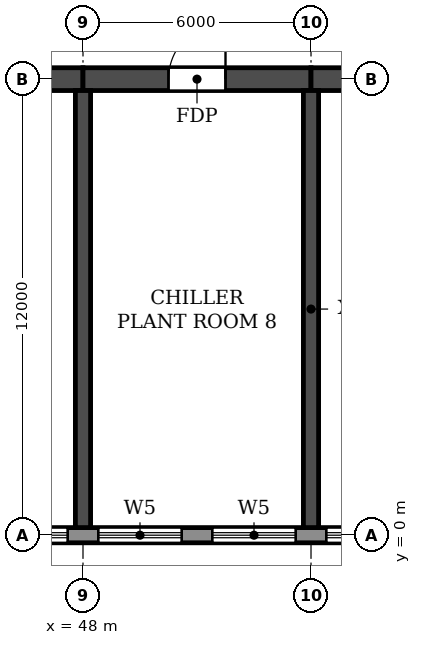
"""IFC4 building model, lengths in metres.
Left out: names, types, materials, properties, quantities, classifications, styles, units other than length and angle.
Written with IfcOpenShell. Run it as: python <this file> out.ifc"""

import sys

from ifc_helpers import new_model, si_unit, direction, frame, frame_2d, origin, place, context, subcontext, project, spatial, rectangle, extrude, element, fill, save


model = new_model("IFC4")
c1 = context("Model", 3, precision=1e-05, world=origin(), true_north=direction((0.0, 1.0)))
c2 = subcontext(c1, "Body", "Model", "MODEL_VIEW")
j1 = project(units=[si_unit("LENGTHUNIT", "METRE"), si_unit("PLANEANGLEUNIT", "RADIAN")], contexts=[c1])
p1 = place(None, origin())
s1 = spatial("IfcSite", under=j1, at=p1, CompositionType="ELEMENT")
p2 = place(p1, origin())
s2 = spatial("IfcBuilding", under=s1, at=p2, CompositionType="ELEMENT")
p3 = place(p2, frame((0.0, 0.0, 66.3)))
s3 = spatial("IfcBuildingStorey", under=s2, at=p3, CompositionType="ELEMENT", Elevation=66.3)
for number, where, z_axis, x_axis in (
    (1, (48.0, 0.2, 0.0), (0.0, 0.0, 1.0), (0.0, 1.0, 0.0)),
    (2, (54.0, 0.2, 0.0), (0.0, 0.0, 1.0), (0.0, 1.0, 0.0)),
):
    element("IfcWall", number, at=place(p3, frame(where, z_axis=z_axis, x_axis=x_axis)), inside=s3, PredefinedType="SHEAR", context=c2, shape_type="SweptSolid", body=[
        extrude(rectangle(XDim=11.5, YDim=0.4, at=frame_2d((5.75, 0.0))), origin(), (0.0, 0.0, 1.0), 6.36),
    ])
p4 = place(p3, frame((42.0, 12.0, 0.0), z_axis=(0.0, 0.0, 1.0), x_axis=(1.0, 0.0, 0.0)))
e3 = element("IfcWall", 3, at=p4, inside=s3, PredefinedType="SHEAR", context=c2, shape_type="SweptSolid", body=[
    extrude(rectangle(XDim=6.0, YDim=0.6, at=frame_2d((3.0, 0.0))), origin(), (0.0, 0.0, 1.0), 6.36),
])
p5 = place(p4, frame((2.25, 0.0, 0.0)))
e4 = element("IfcOpeningElement", 4, at=p5, cuts=e3, PredefinedType="OPENING", context=c2, shape_type="SweptSolid", body=[
    extrude(rectangle(XDim=1.5, YDim=2.1, at=frame_2d((0.75, 1.05))), frame((0.0, 0.31, 0.0), z_axis=(0.0, -1.0, 0.0), x_axis=(1.0, 0.0, 0.0)), (0.0, 0.0, 1.0), 0.62),
])
p6 = place(p3, frame((48.0, 12.0, 0.0), z_axis=(0.0, 0.0, 1.0), x_axis=(1.0, 0.0, 0.0)))
e5 = element("IfcWall", 5, at=p6, inside=s3, PredefinedType="SHEAR", context=c2, shape_type="SweptSolid", body=[
    extrude(rectangle(XDim=6.0, YDim=0.6, at=frame_2d((3.0, 0.0))), origin(), (0.0, 0.0, 1.0), 6.36),
])
p7 = place(p6, frame((2.25, 0.0, 0.0)))
e6 = element("IfcOpeningElement", 6, at=p7, cuts=e5, PredefinedType="OPENING", context=c2, shape_type="SweptSolid", body=[
    extrude(rectangle(XDim=1.5, YDim=2.1, at=frame_2d((0.75, 1.05))), frame((0.0, 0.31, 0.0), z_axis=(0.0, -1.0, 0.0), x_axis=(1.0, 0.0, 0.0)), (0.0, 0.0, 1.0), 0.62),
])
p8 = place(p3, frame((54.0, 12.0, 0.0), z_axis=(0.0, 0.0, 1.0), x_axis=(1.0, 0.0, 0.0)))
e7 = element("IfcWall", 7, at=p8, inside=s3, PredefinedType="SHEAR", context=c2, shape_type="SweptSolid", body=[
    extrude(rectangle(XDim=6.0, YDim=0.6, at=frame_2d((3.0, 0.0))), origin(), (0.0, 0.0, 1.0), 6.36),
])
p9 = place(p8, frame((2.25, 0.0, 0.0)))
e8 = element("IfcOpeningElement", 8, at=p9, cuts=e7, PredefinedType="OPENING", context=c2, shape_type="SweptSolid", body=[
    extrude(rectangle(XDim=1.5, YDim=2.1, at=frame_2d((0.75, 1.05))), frame((0.0, 0.31, 0.0), z_axis=(0.0, -1.0, 0.0), x_axis=(1.0, 0.0, 0.0)), (0.0, 0.0, 1.0), 0.62),
])
p10 = place(p3, frame((10.683, 0.0, 0.0), z_axis=(0.0, 0.0, 1.0), x_axis=(1.0, 0.0, 0.0)))
e9 = element("IfcWall", 9, at=p10, inside=s3, PredefinedType="STANDARD", context=c2, shape_type="SweptSolid", body=[
    extrude(rectangle(XDim=80.634, YDim=0.4, at=frame_2d((40.317, 0.0))), origin(), (0.0, 0.0, 1.0), 6.36),
])
p11 = place(p10, frame((1.717, 0.0, 0.6)))
e10 = element("IfcOpeningElement", 10, at=p11, cuts=e9, PredefinedType="OPENING", context=c2, shape_type="SweptSolid", body=[
    extrude(rectangle(XDim=2.2, YDim=2.4, at=frame_2d((1.1, 1.2))), frame((0.0, 0.21, 0.0), z_axis=(0.0, -1.0, 0.0), x_axis=(1.0, 0.0, 0.0)), (0.0, 0.0, 1.0), 0.42),
])
p12 = place(p10, frame((4.717, 0.0, 0.6)))
e11 = element("IfcOpeningElement", 11, at=p12, cuts=e9, PredefinedType="OPENING", context=c2, shape_type="SweptSolid", body=[
    extrude(rectangle(XDim=2.2, YDim=2.4, at=frame_2d((1.1, 1.2))), frame((0.0, 0.21, 0.0), z_axis=(0.0, -1.0, 0.0), x_axis=(1.0, 0.0, 0.0)), (0.0, 0.0, 1.0), 0.42),
])
p13 = place(p10, frame((7.717, 0.0, 0.6)))
e12 = element("IfcOpeningElement", 12, at=p13, cuts=e9, PredefinedType="OPENING", context=c2, shape_type="SweptSolid", body=[
    extrude(rectangle(XDim=2.2, YDim=2.4, at=frame_2d((1.1, 1.2))), frame((0.0, 0.21, 0.0), z_axis=(0.0, -1.0, 0.0), x_axis=(1.0, 0.0, 0.0)), (0.0, 0.0, 1.0), 0.42),
])
p14 = place(p10, frame((10.717, 0.0, 0.6)))
e13 = element("IfcOpeningElement", 13, at=p14, cuts=e9, PredefinedType="OPENING", context=c2, shape_type="SweptSolid", body=[
    extrude(rectangle(XDim=2.2, YDim=2.4, at=frame_2d((1.1, 1.2))), frame((0.0, 0.21, 0.0), z_axis=(0.0, -1.0, 0.0), x_axis=(1.0, 0.0, 0.0)), (0.0, 0.0, 1.0), 0.42),
])
p15 = place(p10, frame((13.717, 0.0, 0.6)))
e14 = element("IfcOpeningElement", 14, at=p15, cuts=e9, PredefinedType="OPENING", context=c2, shape_type="SweptSolid", body=[
    extrude(rectangle(XDim=2.2, YDim=2.4, at=frame_2d((1.1, 1.2))), frame((0.0, 0.21, 0.0), z_axis=(0.0, -1.0, 0.0), x_axis=(1.0, 0.0, 0.0)), (0.0, 0.0, 1.0), 0.42),
])
p16 = place(p10, frame((16.717, 0.0, 0.6)))
e15 = element("IfcOpeningElement", 15, at=p16, cuts=e9, PredefinedType="OPENING", context=c2, shape_type="SweptSolid", body=[
    extrude(rectangle(XDim=2.2, YDim=2.4, at=frame_2d((1.1, 1.2))), frame((0.0, 0.21, 0.0), z_axis=(0.0, -1.0, 0.0), x_axis=(1.0, 0.0, 0.0)), (0.0, 0.0, 1.0), 0.42),
])
p17 = place(p10, frame((19.717, 0.0, 0.6)))
e16 = element("IfcOpeningElement", 16, at=p17, cuts=e9, PredefinedType="OPENING", context=c2, shape_type="SweptSolid", body=[
    extrude(rectangle(XDim=2.2, YDim=2.4, at=frame_2d((1.1, 1.2))), frame((0.0, 0.21, 0.0), z_axis=(0.0, -1.0, 0.0), x_axis=(1.0, 0.0, 0.0)), (0.0, 0.0, 1.0), 0.42),
])
p18 = place(p10, frame((22.717, 0.0, 0.6)))
e17 = element("IfcOpeningElement", 17, at=p18, cuts=e9, PredefinedType="OPENING", context=c2, shape_type="SweptSolid", body=[
    extrude(rectangle(XDim=2.2, YDim=2.4, at=frame_2d((1.1, 1.2))), frame((0.0, 0.21, 0.0), z_axis=(0.0, -1.0, 0.0), x_axis=(1.0, 0.0, 0.0)), (0.0, 0.0, 1.0), 0.42),
])
p19 = place(p10, frame((25.717, 0.0, 0.6)))
e18 = element("IfcOpeningElement", 18, at=p19, cuts=e9, PredefinedType="OPENING", context=c2, shape_type="SweptSolid", body=[
    extrude(rectangle(XDim=2.2, YDim=2.4, at=frame_2d((1.1, 1.2))), frame((0.0, 0.21, 0.0), z_axis=(0.0, -1.0, 0.0), x_axis=(1.0, 0.0, 0.0)), (0.0, 0.0, 1.0), 0.42),
])
p20 = place(p10, frame((28.717, 0.0, 0.6)))
e19 = element("IfcOpeningElement", 19, at=p20, cuts=e9, PredefinedType="OPENING", context=c2, shape_type="SweptSolid", body=[
    extrude(rectangle(XDim=2.2, YDim=2.4, at=frame_2d((1.1, 1.2))), frame((0.0, 0.21, 0.0), z_axis=(0.0, -1.0, 0.0), x_axis=(1.0, 0.0, 0.0)), (0.0, 0.0, 1.0), 0.42),
])
p21 = place(p10, frame((31.717, 0.0, 0.6)))
e20 = element("IfcOpeningElement", 20, at=p21, cuts=e9, PredefinedType="OPENING", context=c2, shape_type="SweptSolid", body=[
    extrude(rectangle(XDim=2.2, YDim=2.4, at=frame_2d((1.1, 1.2))), frame((0.0, 0.21, 0.0), z_axis=(0.0, -1.0, 0.0), x_axis=(1.0, 0.0, 0.0)), (0.0, 0.0, 1.0), 0.42),
])
p22 = place(p10, frame((34.717, 0.0, 0.6)))
e21 = element("IfcOpeningElement", 21, at=p22, cuts=e9, PredefinedType="OPENING", context=c2, shape_type="SweptSolid", body=[
    extrude(rectangle(XDim=2.2, YDim=2.4, at=frame_2d((1.1, 1.2))), frame((0.0, 0.21, 0.0), z_axis=(0.0, -1.0, 0.0), x_axis=(1.0, 0.0, 0.0)), (0.0, 0.0, 1.0), 0.42),
])
p23 = place(p10, frame((37.717, 0.0, 0.6)))
e22 = element("IfcOpeningElement", 22, at=p23, cuts=e9, PredefinedType="OPENING", context=c2, shape_type="SweptSolid", body=[
    extrude(rectangle(XDim=2.2, YDim=2.4, at=frame_2d((1.1, 1.2))), frame((0.0, 0.21, 0.0), z_axis=(0.0, -1.0, 0.0), x_axis=(1.0, 0.0, 0.0)), (0.0, 0.0, 1.0), 0.42),
])
p24 = place(p10, frame((40.717, 0.0, 0.6)))
e23 = element("IfcOpeningElement", 23, at=p24, cuts=e9, PredefinedType="OPENING", context=c2, shape_type="SweptSolid", body=[
    extrude(rectangle(XDim=2.2, YDim=2.4, at=frame_2d((1.1, 1.2))), frame((0.0, 0.21, 0.0), z_axis=(0.0, -1.0, 0.0), x_axis=(1.0, 0.0, 0.0)), (0.0, 0.0, 1.0), 0.42),
])
p25 = place(p10, frame((43.717, 0.0, 0.6)))
e24 = element("IfcOpeningElement", 24, at=p25, cuts=e9, PredefinedType="OPENING", context=c2, shape_type="SweptSolid", body=[
    extrude(rectangle(XDim=2.2, YDim=2.4, at=frame_2d((1.1, 1.2))), frame((0.0, 0.21, 0.0), z_axis=(0.0, -1.0, 0.0), x_axis=(1.0, 0.0, 0.0)), (0.0, 0.0, 1.0), 0.42),
])
p26 = place(p10, frame((46.717, 0.0, 0.6)))
e25 = element("IfcOpeningElement", 25, at=p26, cuts=e9, PredefinedType="OPENING", context=c2, shape_type="SweptSolid", body=[
    extrude(rectangle(XDim=2.2, YDim=2.4, at=frame_2d((1.1, 1.2))), frame((0.0, 0.21, 0.0), z_axis=(0.0, -1.0, 0.0), x_axis=(1.0, 0.0, 0.0)), (0.0, 0.0, 1.0), 0.42),
])
p27 = place(p10, frame((49.717, 0.0, 0.6)))
e26 = element("IfcOpeningElement", 26, at=p27, cuts=e9, PredefinedType="OPENING", context=c2, shape_type="SweptSolid", body=[
    extrude(rectangle(XDim=2.2, YDim=2.4, at=frame_2d((1.1, 1.2))), frame((0.0, 0.21, 0.0), z_axis=(0.0, -1.0, 0.0), x_axis=(1.0, 0.0, 0.0)), (0.0, 0.0, 1.0), 0.42),
])
p28 = place(p10, frame((52.717, 0.0, 0.6)))
e27 = element("IfcOpeningElement", 27, at=p28, cuts=e9, PredefinedType="OPENING", context=c2, shape_type="SweptSolid", body=[
    extrude(rectangle(XDim=2.2, YDim=2.4, at=frame_2d((1.1, 1.2))), frame((0.0, 0.21, 0.0), z_axis=(0.0, -1.0, 0.0), x_axis=(1.0, 0.0, 0.0)), (0.0, 0.0, 1.0), 0.42),
])
p29 = place(p10, frame((55.717, 0.0, 0.6)))
e28 = element("IfcOpeningElement", 28, at=p29, cuts=e9, PredefinedType="OPENING", context=c2, shape_type="SweptSolid", body=[
    extrude(rectangle(XDim=2.2, YDim=2.4, at=frame_2d((1.1, 1.2))), frame((0.0, 0.21, 0.0), z_axis=(0.0, -1.0, 0.0), x_axis=(1.0, 0.0, 0.0)), (0.0, 0.0, 1.0), 0.42),
])
p30 = place(p10, frame((58.717, 0.0, 0.6)))
e29 = element("IfcOpeningElement", 29, at=p30, cuts=e9, PredefinedType="OPENING", context=c2, shape_type="SweptSolid", body=[
    extrude(rectangle(XDim=2.2, YDim=2.4, at=frame_2d((1.1, 1.2))), frame((0.0, 0.21, 0.0), z_axis=(0.0, -1.0, 0.0), x_axis=(1.0, 0.0, 0.0)), (0.0, 0.0, 1.0), 0.42),
])
p31 = place(p10, frame((61.717, 0.0, 0.6)))
e30 = element("IfcOpeningElement", 30, at=p31, cuts=e9, PredefinedType="OPENING", context=c2, shape_type="SweptSolid", body=[
    extrude(rectangle(XDim=2.2, YDim=2.4, at=frame_2d((1.1, 1.2))), frame((0.0, 0.21, 0.0), z_axis=(0.0, -1.0, 0.0), x_axis=(1.0, 0.0, 0.0)), (0.0, 0.0, 1.0), 0.42),
])
p32 = place(p10, frame((64.717, 0.0, 0.6)))
e31 = element("IfcOpeningElement", 31, at=p32, cuts=e9, PredefinedType="OPENING", context=c2, shape_type="SweptSolid", body=[
    extrude(rectangle(XDim=2.2, YDim=2.4, at=frame_2d((1.1, 1.2))), frame((0.0, 0.21, 0.0), z_axis=(0.0, -1.0, 0.0), x_axis=(1.0, 0.0, 0.0)), (0.0, 0.0, 1.0), 0.42),
])
p33 = place(p10, frame((67.717, 0.0, 0.6)))
e32 = element("IfcOpeningElement", 32, at=p33, cuts=e9, PredefinedType="OPENING", context=c2, shape_type="SweptSolid", body=[
    extrude(rectangle(XDim=2.2, YDim=2.4, at=frame_2d((1.1, 1.2))), frame((0.0, 0.21, 0.0), z_axis=(0.0, -1.0, 0.0), x_axis=(1.0, 0.0, 0.0)), (0.0, 0.0, 1.0), 0.42),
])
p34 = place(p10, frame((70.717, 0.0, 0.6)))
e33 = element("IfcOpeningElement", 33, at=p34, cuts=e9, PredefinedType="OPENING", context=c2, shape_type="SweptSolid", body=[
    extrude(rectangle(XDim=2.2, YDim=2.4, at=frame_2d((1.1, 1.2))), frame((0.0, 0.21, 0.0), z_axis=(0.0, -1.0, 0.0), x_axis=(1.0, 0.0, 0.0)), (0.0, 0.0, 1.0), 0.42),
])
p35 = place(p10, frame((73.717, 0.0, 0.6)))
e34 = element("IfcOpeningElement", 34, at=p35, cuts=e9, PredefinedType="OPENING", context=c2, shape_type="SweptSolid", body=[
    extrude(rectangle(XDim=2.2, YDim=2.4, at=frame_2d((1.1, 1.2))), frame((0.0, 0.21, 0.0), z_axis=(0.0, -1.0, 0.0), x_axis=(1.0, 0.0, 0.0)), (0.0, 0.0, 1.0), 0.42),
])
p36 = place(p10, frame((76.717, 0.0, 0.6)))
e35 = element("IfcOpeningElement", 35, at=p36, cuts=e9, PredefinedType="OPENING", context=c2, shape_type="SweptSolid", body=[
    extrude(rectangle(XDim=2.2, YDim=2.4, at=frame_2d((1.1, 1.2))), frame((0.0, 0.21, 0.0), z_axis=(0.0, -1.0, 0.0), x_axis=(1.0, 0.0, 0.0)), (0.0, 0.0, 1.0), 0.42),
])
p37 = place(p22, origin())
e36 = element("IfcWindow", 36, at=p37, inside=s3, PartitioningType="TRIPLE_PANEL_HORIZONTAL", PredefinedType="WINDOW", context=c2, shape_type="SweptSolid", body=[
    extrude(rectangle(XDim=2.2, YDim=2.4, at=frame_2d((1.1, 1.2))), frame((0.0, 0.03, 0.0), z_axis=(0.0, -1.0, 0.0), x_axis=(1.0, 0.0, 0.0)), (0.0, 0.0, 1.0), 0.06),
])
fill(e21, e36)
p38 = place(p23, origin())
e37 = element("IfcWindow", 37, at=p38, inside=s3, PartitioningType="TRIPLE_PANEL_HORIZONTAL", PredefinedType="WINDOW", context=c2, shape_type="SweptSolid", body=[
    extrude(rectangle(XDim=2.2, YDim=2.4, at=frame_2d((1.1, 1.2))), frame((0.0, 0.03, 0.0), z_axis=(0.0, -1.0, 0.0), x_axis=(1.0, 0.0, 0.0)), (0.0, 0.0, 1.0), 0.06),
])
fill(e22, e37)
p39 = place(p24, origin())
e38 = element("IfcWindow", 38, at=p39, inside=s3, PartitioningType="TRIPLE_PANEL_HORIZONTAL", PredefinedType="WINDOW", context=c2, shape_type="SweptSolid", body=[
    extrude(rectangle(XDim=2.2, YDim=2.4, at=frame_2d((1.1, 1.2))), frame((0.0, 0.03, 0.0), z_axis=(0.0, -1.0, 0.0), x_axis=(1.0, 0.0, 0.0)), (0.0, 0.0, 1.0), 0.06),
])
fill(e23, e38)
p40 = place(p25, origin())
e39 = element("IfcWindow", 39, at=p40, inside=s3, PartitioningType="TRIPLE_PANEL_HORIZONTAL", PredefinedType="WINDOW", context=c2, shape_type="SweptSolid", body=[
    extrude(rectangle(XDim=2.2, YDim=2.4, at=frame_2d((1.1, 1.2))), frame((0.0, 0.03, 0.0), z_axis=(0.0, -1.0, 0.0), x_axis=(1.0, 0.0, 0.0)), (0.0, 0.0, 1.0), 0.06),
])
fill(e24, e39)
p41 = place(p7, origin())
e40 = element("IfcDoor", 40, at=p41, inside=s3, OperationType="DOUBLE_DOOR_SINGLE_SWING", PredefinedType="DOOR", context=c2, shape_type="SweptSolid", body=[
    extrude(rectangle(XDim=1.5, YDim=2.1, at=frame_2d((0.75, 1.05))), frame((0.0, 0.025, 0.0), z_axis=(0.0, -1.0, 0.0), x_axis=(1.0, 0.0, 0.0)), (0.0, 0.0, 1.0), 0.05),
])
fill(e6, e40)
save(model, sys.argv[1])
